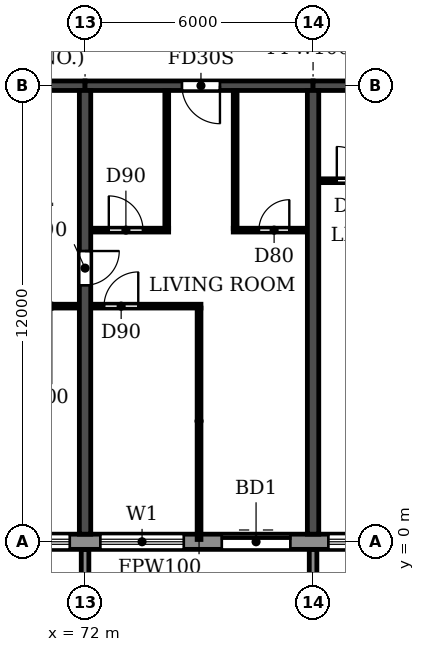
"""IFC4 building model, lengths in metres.
Left out: names, types, materials, properties, quantities, classifications, styles, units other than length and angle.
Written with IfcOpenShell. Run it as: python <this file> out.ifc"""

import sys

from ifc_helpers import new_model, si_unit, direction, frame, frame_2d, origin, place, context, subcontext, project, spatial, polyline, rectangle, outline, extrude, source, transform, mapped, element, fill, save


model = new_model("IFC4")
c1 = context("Model", 3, precision=1e-05, world=origin(), true_north=direction((0.0, 1.0)))
c2 = subcontext(c1, "Body", "Model", "MODEL_VIEW")
j1 = project(units=[si_unit("LENGTHUNIT", "METRE"), si_unit("PLANEANGLEUNIT", "RADIAN")], contexts=[c1])
p1 = place(None, origin())
s1 = spatial("IfcSite", under=j1, at=p1, CompositionType="ELEMENT")
p2 = place(p1, origin())
s2 = spatial("IfcBuilding", under=s1, at=p2, CompositionType="ELEMENT")
p3 = place(p2, frame((0.0, 0.0, 125.7)))
s3 = spatial("IfcBuildingStorey", under=s2, at=p3, CompositionType="ELEMENT", Elevation=125.7)
p4 = place(p3, frame((72.0, 0.2, 0.0), z_axis=(0.0, 0.0, 1.0), x_axis=(0.0, 1.0, 0.0)))
e1 = element("IfcWall", 1, at=p4, inside=s3, PredefinedType="SHEAR", context=c2, shape_type="SweptSolid", body=[
    extrude(rectangle(XDim=11.675, YDim=0.3, at=frame_2d((5.837, 0.0))), origin(), (0.0, 0.0, 1.0), 3.07),
])
p5 = place(p4, frame((6.55, 0.0, 0.0)))
e2 = element("IfcOpeningElement", 2, at=p5, cuts=e1, PredefinedType="OPENING", context=c2, shape_type="SweptSolid", body=[
    extrude(rectangle(XDim=0.9, YDim=2.1, at=frame_2d((0.45, 1.05))), frame((0.0, 0.16, 0.0), z_axis=(0.0, -1.0, 0.0), x_axis=(1.0, 0.0, 0.0)), (0.0, 0.0, 1.0), 0.32),
])
p6 = place(p3, frame((78.0, 0.2, 0.0), z_axis=(0.0, 0.0, 1.0), x_axis=(0.0, 1.0, 0.0)))
e3 = element("IfcWall", 3, at=p6, inside=s3, PredefinedType="SHEAR", context=c2, shape_type="SweptSolid", body=[
    extrude(rectangle(XDim=11.675, YDim=0.3, at=frame_2d((5.837, 0.0))), origin(), (0.0, 0.0, 1.0), 3.07),
])
p7 = place(p3, frame((66.0, 12.0, 0.0), z_axis=(0.0, 0.0, 1.0), x_axis=(1.0, 0.0, 0.0)))
e4 = element("IfcWall", 4, at=p7, inside=s3, PredefinedType="SHEAR", context=c2, shape_type="SweptSolid", body=[
    extrude(rectangle(XDim=6.0, YDim=0.25, at=frame_2d((3.0, 0.0))), origin(), (0.0, 0.0, 1.0), 2.47),
])
p8 = place(p3, frame((72.0, 12.0, 0.0), z_axis=(0.0, 0.0, 1.0), x_axis=(1.0, 0.0, 0.0)))
e5 = element("IfcWall", 5, at=p8, inside=s3, PredefinedType="SHEAR", context=c2, shape_type="SweptSolid", body=[
    extrude(rectangle(XDim=6.0, YDim=0.25, at=frame_2d((3.0, 0.0))), origin(), (0.0, 0.0, 1.0), 2.47),
])
p9 = place(p8, frame((2.55, 0.0, 0.0)))
e6 = element("IfcOpeningElement", 6, at=p9, cuts=e5, PredefinedType="OPENING", context=c2, shape_type="SweptSolid", body=[
    extrude(rectangle(XDim=1.0, YDim=2.1, at=frame_2d((0.5, 1.05))), frame((0.0, 0.135, 0.0), z_axis=(0.0, -1.0, 0.0), x_axis=(1.0, 0.0, 0.0)), (0.0, 0.0, 1.0), 0.27),
])
p10 = place(p3, frame((78.0, 12.0, 0.0), z_axis=(0.0, 0.0, 1.0), x_axis=(1.0, 0.0, 0.0)))
e7 = element("IfcWall", 7, at=p10, inside=s3, PredefinedType="SHEAR", context=c2, shape_type="SweptSolid", body=[
    extrude(rectangle(XDim=6.0, YDim=0.25, at=frame_2d((3.0, 0.0))), origin(), (0.0, 0.0, 1.0), 2.47),
])
p11 = place(p10, frame((2.55, 0.0, 0.0)))
e8 = element("IfcOpeningElement", 8, at=p11, cuts=e7, PredefinedType="OPENING", context=c2, shape_type="SweptSolid", body=[
    extrude(rectangle(XDim=1.0, YDim=2.1, at=frame_2d((0.5, 1.05))), frame((0.0, 0.135, 0.0), z_axis=(0.0, -1.0, 0.0), x_axis=(1.0, 0.0, 0.0)), (0.0, 0.0, 1.0), 0.27),
])
p12 = place(p3, frame((16.683, 0.0, 0.0), z_axis=(0.0, 0.0, 1.0), x_axis=(1.0, 0.0, 0.0)))
e9 = element("IfcWall", 9, at=p12, inside=s3, PredefinedType="STANDARD", context=c2, shape_type="SweptSolid", body=[
    extrude(rectangle(XDim=68.634, YDim=0.4, at=frame_2d((34.317, 0.0))), origin(), (0.0, 0.0, 1.0), 3.07),
])
p13 = place(p12, frame((1.717, 0.0, 0.9)))
e10 = element("IfcOpeningElement", 10, at=p13, cuts=e9, PredefinedType="OPENING", context=c2, shape_type="SweptSolid", body=[
    extrude(rectangle(XDim=2.2, YDim=1.5, at=frame_2d((1.1, 0.75))), frame((0.0, 0.21, 0.0), z_axis=(0.0, -1.0, 0.0), x_axis=(1.0, 0.0, 0.0)), (0.0, 0.0, 1.0), 0.42),
])
p14 = place(p12, frame((4.717, 0.0, 0.9)))
e11 = element("IfcOpeningElement", 11, at=p14, cuts=e9, PredefinedType="OPENING", context=c2, shape_type="SweptSolid", body=[
    extrude(rectangle(XDim=2.2, YDim=1.5, at=frame_2d((1.1, 0.75))), frame((0.0, 0.21, 0.0), z_axis=(0.0, -1.0, 0.0), x_axis=(1.0, 0.0, 0.0)), (0.0, 0.0, 1.0), 0.42),
])
p15 = place(p12, frame((7.717, 0.0, 0.9)))
e12 = element("IfcOpeningElement", 12, at=p15, cuts=e9, PredefinedType="OPENING", context=c2, shape_type="SweptSolid", body=[
    extrude(rectangle(XDim=2.2, YDim=1.5, at=frame_2d((1.1, 0.75))), frame((0.0, 0.21, 0.0), z_axis=(0.0, -1.0, 0.0), x_axis=(1.0, 0.0, 0.0)), (0.0, 0.0, 1.0), 0.42),
])
p16 = place(p12, frame((10.717, 0.0, 0.9)))
e13 = element("IfcOpeningElement", 13, at=p16, cuts=e9, PredefinedType="OPENING", context=c2, shape_type="SweptSolid", body=[
    extrude(rectangle(XDim=2.2, YDim=1.5, at=frame_2d((1.1, 0.75))), frame((0.0, 0.21, 0.0), z_axis=(0.0, -1.0, 0.0), x_axis=(1.0, 0.0, 0.0)), (0.0, 0.0, 1.0), 0.42),
])
p17 = place(p12, frame((13.717, 0.0, 0.9)))
e14 = element("IfcOpeningElement", 14, at=p17, cuts=e9, PredefinedType="OPENING", context=c2, shape_type="SweptSolid", body=[
    extrude(rectangle(XDim=2.2, YDim=1.5, at=frame_2d((1.1, 0.75))), frame((0.0, 0.21, 0.0), z_axis=(0.0, -1.0, 0.0), x_axis=(1.0, 0.0, 0.0)), (0.0, 0.0, 1.0), 0.42),
])
p18 = place(p12, frame((16.717, 0.0, 0.9)))
e15 = element("IfcOpeningElement", 15, at=p18, cuts=e9, PredefinedType="OPENING", context=c2, shape_type="SweptSolid", body=[
    extrude(rectangle(XDim=2.2, YDim=1.5, at=frame_2d((1.1, 0.75))), frame((0.0, 0.21, 0.0), z_axis=(0.0, -1.0, 0.0), x_axis=(1.0, 0.0, 0.0)), (0.0, 0.0, 1.0), 0.42),
])
p19 = place(p12, frame((19.717, 0.0, 0.9)))
e16 = element("IfcOpeningElement", 16, at=p19, cuts=e9, PredefinedType="OPENING", context=c2, shape_type="SweptSolid", body=[
    extrude(rectangle(XDim=2.2, YDim=1.5, at=frame_2d((1.1, 0.75))), frame((0.0, 0.21, 0.0), z_axis=(0.0, -1.0, 0.0), x_axis=(1.0, 0.0, 0.0)), (0.0, 0.0, 1.0), 0.42),
])
p20 = place(p12, frame((22.917, 0.0, 0.0)))
e17 = element("IfcOpeningElement", 17, at=p20, cuts=e9, PredefinedType="OPENING", context=c2, shape_type="SweptSolid", body=[
    extrude(rectangle(XDim=1.8, YDim=2.4, at=frame_2d((0.9, 1.2))), frame((0.0, 0.21, 0.0), z_axis=(0.0, -1.0, 0.0), x_axis=(1.0, 0.0, 0.0)), (0.0, 0.0, 1.0), 0.42),
])
p21 = place(p12, frame((25.717, 0.0, 0.9)))
e18 = element("IfcOpeningElement", 18, at=p21, cuts=e9, PredefinedType="OPENING", context=c2, shape_type="SweptSolid", body=[
    extrude(rectangle(XDim=2.2, YDim=1.5, at=frame_2d((1.1, 0.75))), frame((0.0, 0.21, 0.0), z_axis=(0.0, -1.0, 0.0), x_axis=(1.0, 0.0, 0.0)), (0.0, 0.0, 1.0), 0.42),
])
p22 = place(p12, frame((28.717, 0.0, 0.9)))
e19 = element("IfcOpeningElement", 19, at=p22, cuts=e9, PredefinedType="OPENING", context=c2, shape_type="SweptSolid", body=[
    extrude(rectangle(XDim=2.2, YDim=1.5, at=frame_2d((1.1, 0.75))), frame((0.0, 0.21, 0.0), z_axis=(0.0, -1.0, 0.0), x_axis=(1.0, 0.0, 0.0)), (0.0, 0.0, 1.0), 0.42),
])
p23 = place(p12, frame((31.717, 0.0, 0.9)))
e20 = element("IfcOpeningElement", 20, at=p23, cuts=e9, PredefinedType="OPENING", context=c2, shape_type="SweptSolid", body=[
    extrude(rectangle(XDim=2.2, YDim=1.5, at=frame_2d((1.1, 0.75))), frame((0.0, 0.21, 0.0), z_axis=(0.0, -1.0, 0.0), x_axis=(1.0, 0.0, 0.0)), (0.0, 0.0, 1.0), 0.42),
])
p24 = place(p12, frame((34.917, 0.0, 0.0)))
e21 = element("IfcOpeningElement", 21, at=p24, cuts=e9, PredefinedType="OPENING", context=c2, shape_type="SweptSolid", body=[
    extrude(rectangle(XDim=1.8, YDim=2.4, at=frame_2d((0.9, 1.2))), frame((0.0, 0.21, 0.0), z_axis=(0.0, -1.0, 0.0), x_axis=(1.0, 0.0, 0.0)), (0.0, 0.0, 1.0), 0.42),
])
p25 = place(p12, frame((37.717, 0.0, 0.9)))
e22 = element("IfcOpeningElement", 22, at=p25, cuts=e9, PredefinedType="OPENING", context=c2, shape_type="SweptSolid", body=[
    extrude(rectangle(XDim=2.2, YDim=1.5, at=frame_2d((1.1, 0.75))), frame((0.0, 0.21, 0.0), z_axis=(0.0, -1.0, 0.0), x_axis=(1.0, 0.0, 0.0)), (0.0, 0.0, 1.0), 0.42),
])
p26 = place(p12, frame((40.717, 0.0, 0.9)))
e23 = element("IfcOpeningElement", 23, at=p26, cuts=e9, PredefinedType="OPENING", context=c2, shape_type="SweptSolid", body=[
    extrude(rectangle(XDim=2.2, YDim=1.5, at=frame_2d((1.1, 0.75))), frame((0.0, 0.21, 0.0), z_axis=(0.0, -1.0, 0.0), x_axis=(1.0, 0.0, 0.0)), (0.0, 0.0, 1.0), 0.42),
])
p27 = place(p12, frame((43.717, 0.0, 0.9)))
e24 = element("IfcOpeningElement", 24, at=p27, cuts=e9, PredefinedType="OPENING", context=c2, shape_type="SweptSolid", body=[
    extrude(rectangle(XDim=2.2, YDim=1.5, at=frame_2d((1.1, 0.75))), frame((0.0, 0.21, 0.0), z_axis=(0.0, -1.0, 0.0), x_axis=(1.0, 0.0, 0.0)), (0.0, 0.0, 1.0), 0.42),
])
p28 = place(p12, frame((46.917, 0.0, 0.0)))
e25 = element("IfcOpeningElement", 25, at=p28, cuts=e9, PredefinedType="OPENING", context=c2, shape_type="SweptSolid", body=[
    extrude(rectangle(XDim=1.8, YDim=2.4, at=frame_2d((0.9, 1.2))), frame((0.0, 0.21, 0.0), z_axis=(0.0, -1.0, 0.0), x_axis=(1.0, 0.0, 0.0)), (0.0, 0.0, 1.0), 0.42),
])
p29 = place(p12, frame((49.717, 0.0, 0.9)))
e26 = element("IfcOpeningElement", 26, at=p29, cuts=e9, PredefinedType="OPENING", context=c2, shape_type="SweptSolid", body=[
    extrude(rectangle(XDim=2.2, YDim=1.5, at=frame_2d((1.1, 0.75))), frame((0.0, 0.21, 0.0), z_axis=(0.0, -1.0, 0.0), x_axis=(1.0, 0.0, 0.0)), (0.0, 0.0, 1.0), 0.42),
])
p30 = place(p12, frame((52.717, 0.0, 0.9)))
e27 = element("IfcOpeningElement", 27, at=p30, cuts=e9, PredefinedType="OPENING", context=c2, shape_type="SweptSolid", body=[
    extrude(rectangle(XDim=2.2, YDim=1.5, at=frame_2d((1.1, 0.75))), frame((0.0, 0.21, 0.0), z_axis=(0.0, -1.0, 0.0), x_axis=(1.0, 0.0, 0.0)), (0.0, 0.0, 1.0), 0.42),
])
p31 = place(p12, frame((55.717, 0.0, 0.9)))
e28 = element("IfcOpeningElement", 28, at=p31, cuts=e9, PredefinedType="OPENING", context=c2, shape_type="SweptSolid", body=[
    extrude(rectangle(XDim=2.2, YDim=1.5, at=frame_2d((1.1, 0.75))), frame((0.0, 0.21, 0.0), z_axis=(0.0, -1.0, 0.0), x_axis=(1.0, 0.0, 0.0)), (0.0, 0.0, 1.0), 0.42),
])
p32 = place(p12, frame((58.917, 0.0, 0.0)))
e29 = element("IfcOpeningElement", 29, at=p32, cuts=e9, PredefinedType="OPENING", context=c2, shape_type="SweptSolid", body=[
    extrude(rectangle(XDim=1.8, YDim=2.4, at=frame_2d((0.9, 1.2))), frame((0.0, 0.21, 0.0), z_axis=(0.0, -1.0, 0.0), x_axis=(1.0, 0.0, 0.0)), (0.0, 0.0, 1.0), 0.42),
])
p33 = place(p12, frame((61.717, 0.0, 0.9)))
e30 = element("IfcOpeningElement", 30, at=p33, cuts=e9, PredefinedType="OPENING", context=c2, shape_type="SweptSolid", body=[
    extrude(rectangle(XDim=2.2, YDim=1.5, at=frame_2d((1.1, 0.75))), frame((0.0, 0.21, 0.0), z_axis=(0.0, -1.0, 0.0), x_axis=(1.0, 0.0, 0.0)), (0.0, 0.0, 1.0), 0.42),
])
p34 = place(p12, frame((64.717, 0.0, 0.9)))
e31 = element("IfcOpeningElement", 31, at=p34, cuts=e9, PredefinedType="OPENING", context=c2, shape_type="SweptSolid", body=[
    extrude(rectangle(XDim=2.2, YDim=1.5, at=frame_2d((1.1, 0.75))), frame((0.0, 0.21, 0.0), z_axis=(0.0, -1.0, 0.0), x_axis=(1.0, 0.0, 0.0)), (0.0, 0.0, 1.0), 0.42),
])
m1 = source(origin(), c2, "Body", "SweptSolid", [
    extrude(outline(polyline([(0.0, 0.0), (0.2, 0.0), (0.2, 1.65), (0.0, 1.65), (0.0, 0.0)])), origin(), (0.0, 0.0, 1.0), 3.1),
])
for number, where in (
    (32, (71.9, -1.85, 0.0)),
    (33, (77.9, -1.85, 0.0)),
):
    element("IfcWall", number, at=place(p3, frame(where)), inside=s3, PredefinedType="STANDARD", context=c2, shape_type="MappedRepresentation", body=[
        mapped(m1, transform((0.0, 0.0, 0.0))),
    ])
p35 = place(p3, frame((66.16, 6.2, 0.0), z_axis=(0.0, 0.0, 1.0), x_axis=(1.0, 0.0, 0.0)))
e34 = element("IfcWall", 34, at=p35, inside=s3, PredefinedType="PARTITIONING", context=c2, shape_type="SweptSolid", body=[
    extrude(rectangle(XDim=5.68, YDim=0.1, at=frame_2d((2.84, 0.0))), origin(), (0.0, 0.0, 1.0), 3.07),
])
p36 = place(p35, frame((1.44, 0.0, 0.0)))
e35 = element("IfcOpeningElement", 35, at=p36, cuts=e34, PredefinedType="OPENING", context=c2, shape_type="SweptSolid", body=[
    extrude(rectangle(XDim=0.9, YDim=2.1, at=frame_2d((0.45, 1.05))), frame((0.0, 0.06, 0.0), z_axis=(0.0, -1.0, 0.0), x_axis=(1.0, 0.0, 0.0)), (0.0, 0.0, 1.0), 0.12),
])
p37 = place(p35, frame((3.34, 0.0, 0.0)))
e36 = element("IfcOpeningElement", 36, at=p37, cuts=e34, PredefinedType="OPENING", context=c2, shape_type="SweptSolid", body=[
    extrude(rectangle(XDim=0.9, YDim=2.1, at=frame_2d((0.45, 1.05))), frame((0.0, 0.06, 0.0), z_axis=(0.0, -1.0, 0.0), x_axis=(1.0, 0.0, 0.0)), (0.0, 0.0, 1.0), 0.12),
])
p38 = place(p3, frame((72.16, 6.2, 0.0), z_axis=(0.0, 0.0, 1.0), x_axis=(1.0, 0.0, 0.0)))
e37 = element("IfcWall", 37, at=p38, inside=s3, PredefinedType="PARTITIONING", context=c2, shape_type="SweptSolid", body=[
    extrude(rectangle(XDim=2.89, YDim=0.1, at=frame_2d((1.445, 0.0))), origin(), (0.0, 0.0, 1.0), 3.07),
])
p39 = place(p38, frame((0.34, 0.0, 0.0)))
e38 = element("IfcOpeningElement", 38, at=p39, cuts=e37, PredefinedType="OPENING", context=c2, shape_type="SweptSolid", body=[
    extrude(rectangle(XDim=0.9, YDim=2.1, at=frame_2d((0.45, 1.05))), frame((0.0, 0.06, 0.0), z_axis=(0.0, -1.0, 0.0), x_axis=(1.0, 0.0, 0.0)), (0.0, 0.0, 1.0), 0.12),
])
p40 = place(p3, frame((72.16, 8.2, 0.0), z_axis=(0.0, 0.0, 1.0), x_axis=(1.0, 0.0, 0.0)))
e39 = element("IfcWall", 39, at=p40, inside=s3, PredefinedType="PARTITIONING", context=c2, shape_type="SweptSolid", body=[
    extrude(rectangle(XDim=2.04, YDim=0.1, at=frame_2d((1.02, 0.0))), origin(), (0.0, 0.0, 1.0), 3.07),
])
p41 = place(p40, frame((0.465, 0.0, 0.0)))
e40 = element("IfcOpeningElement", 40, at=p41, cuts=e39, PredefinedType="OPENING", context=c2, shape_type="SweptSolid", body=[
    extrude(rectangle(XDim=0.9, YDim=2.1, at=frame_2d((0.45, 1.05))), frame((0.0, 0.06, 0.0), z_axis=(0.0, -1.0, 0.0), x_axis=(1.0, 0.0, 0.0)), (0.0, 0.0, 1.0), 0.12),
])
p42 = place(p3, frame((75.9, 8.2, 0.0), z_axis=(0.0, 0.0, 1.0), x_axis=(1.0, 0.0, 0.0)))
e41 = element("IfcWall", 41, at=p42, inside=s3, PredefinedType="PARTITIONING", context=c2, shape_type="SweptSolid", body=[
    extrude(rectangle(XDim=1.94, YDim=0.1, at=frame_2d((0.97, 0.0))), origin(), (0.0, 0.0, 1.0), 3.07),
])
p43 = place(p42, frame((0.675, 0.0, 0.0)))
e42 = element("IfcOpeningElement", 42, at=p43, cuts=e41, PredefinedType="OPENING", context=c2, shape_type="SweptSolid", body=[
    extrude(rectangle(XDim=0.8, YDim=2.1, at=frame_2d((0.4, 1.05))), frame((0.0, 0.06, 0.0), z_axis=(0.0, -1.0, 0.0), x_axis=(1.0, 0.0, 0.0)), (0.0, 0.0, 1.0), 0.12),
])
p44 = place(p3, frame((78.16, 9.5, 0.0), z_axis=(0.0, 0.0, 1.0), x_axis=(1.0, 0.0, 0.0)))
e43 = element("IfcWall", 43, at=p44, inside=s3, PredefinedType="PARTITIONING", context=c2, shape_type="SweptSolid", body=[
    extrude(rectangle(XDim=2.04, YDim=0.1, at=frame_2d((1.02, 0.0))), origin(), (0.0, 0.0, 1.0), 3.07),
])
p45 = place(p44, frame((0.465, 0.0, 0.0)))
e44 = element("IfcOpeningElement", 44, at=p45, cuts=e43, PredefinedType="OPENING", context=c2, shape_type="SweptSolid", body=[
    extrude(rectangle(XDim=0.9, YDim=2.1, at=frame_2d((0.45, 1.05))), frame((0.0, 0.06, 0.0), z_axis=(0.0, -1.0, 0.0), x_axis=(1.0, 0.0, 0.0)), (0.0, 0.0, 1.0), 0.12),
])
p46 = place(p3, frame((74.15, 8.25, 0.0), z_axis=(0.0, 0.0, 1.0), x_axis=(0.0, 1.0, 0.0)))
e45 = element("IfcWall", 45, at=p46, inside=s3, PredefinedType="PARTITIONING", context=c2, shape_type="SweptSolid", body=[
    extrude(rectangle(XDim=3.615, YDim=0.1, at=frame_2d((1.808, 0.0))), origin(), (0.0, 0.0, 1.0), 3.07),
])
p47 = place(p3, frame((75.0, 0.06, 0.0), z_axis=(0.0, 0.0, 1.0), x_axis=(0.0, 1.0, 0.0)))
e46 = element("IfcWall", 46, at=p47, inside=s3, PredefinedType="PARTITIONING", context=c2, shape_type="SweptSolid", body=[
    extrude(rectangle(XDim=6.09, YDim=0.1, at=frame_2d((3.045, 0.0))), origin(), (0.0, 0.0, 1.0), 3.07),
])
p48 = place(p3, frame((75.95, 8.25, 0.0), z_axis=(0.0, 0.0, 1.0), x_axis=(0.0, 1.0, 0.0)))
e47 = element("IfcWall", 47, at=p48, inside=s3, PredefinedType="PARTITIONING", context=c2, shape_type="SweptSolid", body=[
    extrude(rectangle(XDim=3.615, YDim=0.1, at=frame_2d((1.808, 0.0))), origin(), (0.0, 0.0, 1.0), 3.07),
])
p49 = place(p30, origin())
e48 = element("IfcWindow", 48, at=p49, inside=s3, PartitioningType="DOUBLE_PANEL_HORIZONTAL", PredefinedType="WINDOW", context=c2, shape_type="SweptSolid", body=[
    extrude(rectangle(XDim=2.2, YDim=1.5, at=frame_2d((1.1, 0.75))), frame((0.0, 0.03, 0.0), z_axis=(0.0, -1.0, 0.0), x_axis=(1.0, 0.0, 0.0)), (0.0, 0.0, 1.0), 0.06),
])
fill(e27, e48)
p50 = place(p31, origin())
e49 = element("IfcWindow", 49, at=p50, inside=s3, PartitioningType="DOUBLE_PANEL_HORIZONTAL", PredefinedType="WINDOW", context=c2, shape_type="SweptSolid", body=[
    extrude(rectangle(XDim=2.2, YDim=1.5, at=frame_2d((1.1, 0.75))), frame((0.0, 0.03, 0.0), z_axis=(0.0, -1.0, 0.0), x_axis=(1.0, 0.0, 0.0)), (0.0, 0.0, 1.0), 0.06),
])
fill(e28, e49)
p51 = place(p32, origin())
e50 = element("IfcDoor", 50, at=p51, inside=s3, OperationType="DOUBLE_DOOR_SLIDING", PredefinedType="DOOR", context=c2, shape_type="SweptSolid", body=[
    extrude(rectangle(XDim=1.8, YDim=2.4, at=frame_2d((0.9, 1.2))), frame((0.0, 0.025, 0.0), z_axis=(0.0, -1.0, 0.0), x_axis=(1.0, 0.0, 0.0)), (0.0, 0.0, 1.0), 0.05),
])
fill(e29, e50)
p52 = place(p33, origin())
e51 = element("IfcWindow", 51, at=p52, inside=s3, PartitioningType="DOUBLE_PANEL_HORIZONTAL", PredefinedType="WINDOW", context=c2, shape_type="SweptSolid", body=[
    extrude(rectangle(XDim=2.2, YDim=1.5, at=frame_2d((1.1, 0.75))), frame((0.0, 0.03, 0.0), z_axis=(0.0, -1.0, 0.0), x_axis=(1.0, 0.0, 0.0)), (0.0, 0.0, 1.0), 0.06),
])
fill(e30, e51)
p53 = place(p5, frame((0.9, 0.0, 0.0), z_axis=(0.0, 0.0, 1.0), x_axis=(-1.0, 0.0, 0.0)))
e52 = element("IfcDoor", 52, at=p53, inside=s3, OperationType="SINGLE_SWING_LEFT", PredefinedType="DOOR", context=c2, shape_type="SweptSolid", body=[
    extrude(rectangle(XDim=0.9, YDim=2.1, at=frame_2d((0.45, 1.05))), frame((0.0, 0.025, 0.0), z_axis=(0.0, -1.0, 0.0), x_axis=(1.0, 0.0, 0.0)), (0.0, 0.0, 1.0), 0.05),
])
fill(e2, e52)
p54 = place(p39, origin())
e53 = element("IfcDoor", 53, at=p54, inside=s3, OperationType="SINGLE_SWING_RIGHT", PredefinedType="DOOR", context=c2, shape_type="SweptSolid", body=[
    extrude(rectangle(XDim=0.9, YDim=2.1, at=frame_2d((0.45, 1.05))), frame((0.0, 0.025, 0.0), z_axis=(0.0, -1.0, 0.0), x_axis=(1.0, 0.0, 0.0)), (0.0, 0.0, 1.0), 0.05),
])
fill(e38, e53)
p55 = place(p41, origin())
e54 = element("IfcDoor", 54, at=p55, inside=s3, OperationType="SINGLE_SWING_LEFT", PredefinedType="DOOR", context=c2, shape_type="SweptSolid", body=[
    extrude(rectangle(XDim=0.9, YDim=2.1, at=frame_2d((0.45, 1.05))), frame((0.0, 0.025, 0.0), z_axis=(0.0, -1.0, 0.0), x_axis=(1.0, 0.0, 0.0)), (0.0, 0.0, 1.0), 0.05),
])
fill(e40, e54)
p56 = place(p9, frame((1.0, 0.0, 0.0), z_axis=(0.0, 0.0, 1.0), x_axis=(-1.0, 0.0, 0.0)))
e55 = element("IfcDoor", 55, at=p56, inside=s3, OperationType="SINGLE_SWING_LEFT", PredefinedType="DOOR", context=c2, shape_type="SweptSolid", body=[
    extrude(rectangle(XDim=1.0, YDim=2.1, at=frame_2d((0.5, 1.05))), frame((0.0, 0.025, 0.0), z_axis=(0.0, -1.0, 0.0), x_axis=(1.0, 0.0, 0.0)), (0.0, 0.0, 1.0), 0.05),
])
fill(e6, e55)
p57 = place(p43, origin())
e56 = element("IfcDoor", 56, at=p57, inside=s3, OperationType="SINGLE_SWING_RIGHT", PredefinedType="DOOR", context=c2, shape_type="SweptSolid", body=[
    extrude(rectangle(XDim=0.8, YDim=2.1, at=frame_2d((0.4, 1.05))), frame((0.0, 0.025, 0.0), z_axis=(0.0, -1.0, 0.0), x_axis=(1.0, 0.0, 0.0)), (0.0, 0.0, 1.0), 0.05),
])
fill(e42, e56)
p58 = place(p45, origin())
e57 = element("IfcDoor", 57, at=p58, inside=s3, OperationType="SINGLE_SWING_LEFT", PredefinedType="DOOR", context=c2, shape_type="SweptSolid", body=[
    extrude(rectangle(XDim=0.9, YDim=2.1, at=frame_2d((0.45, 1.05))), frame((0.0, 0.025, 0.0), z_axis=(0.0, -1.0, 0.0), x_axis=(1.0, 0.0, 0.0)), (0.0, 0.0, 1.0), 0.05),
])
fill(e44, e57)
save(model, sys.argv[1])
